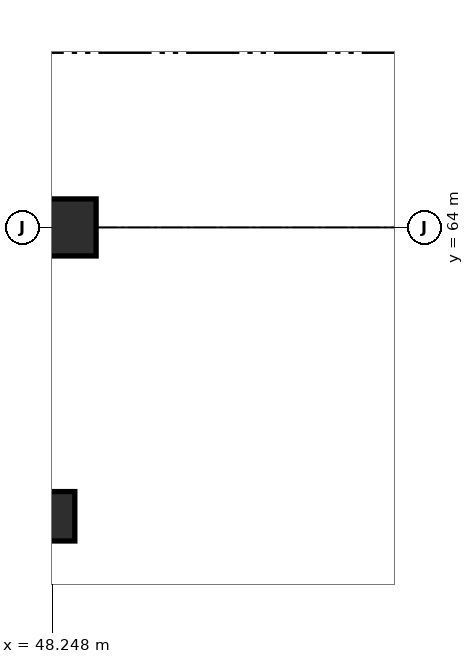
"""IFC4 building model, lengths in metres.
Left out: names, types, materials, properties, quantities, classifications, styles, units other than length and angle.
Written with IfcOpenShell. Run it as: python <this file> out.ifc"""

import sys

from ifc_helpers import new_model, si_unit, direction, frame, origin, origin_2d, place, context, subcontext, project, spatial, rectangle, extrude, element, save


model = new_model("IFC4")
c1 = context("Model", 3, precision=1e-05, world=origin(), true_north=direction((0.0, 1.0)))
c2 = subcontext(c1, "Body", "Model", "MODEL_VIEW")
j1 = project(units=[si_unit("LENGTHUNIT", "METRE"), si_unit("PLANEANGLEUNIT", "RADIAN")], contexts=[c1])
p1 = place(None, origin())
s1 = spatial("IfcSite", under=j1, at=p1, CompositionType="ELEMENT")
p2 = place(p1, origin())
s2 = spatial("IfcBuilding", under=s1, at=p2, CompositionType="ELEMENT")
p3 = place(p2, frame((0.0, 0.0, -3.84)))
s3 = spatial("IfcBuildingStorey", under=s2, at=p3, CompositionType="ELEMENT", Elevation=-3.84)
p4 = place(p3, frame((48.22, 60.2, 0.0), z_axis=(0.0, 0.0, 1.0), x_axis=(1.0, 0.0, 0.0)))
e1 = element("IfcColumn", 1, at=p4, inside=s3, PredefinedType="COLUMN", context=c2, shape_type="SweptSolid", body=[
    extrude(rectangle(XDim=0.65, YDim=0.65, at=origin_2d()), origin(), (0.0, 0.0, 1.0), 3.84),
])
p5 = place(p3, frame((48.45, 64.0, 0.0), z_axis=(0.0, 0.0, 1.0), x_axis=(1.0, 0.0, 0.0)))
e2 = element("IfcColumn", 2, at=p5, inside=s3, PredefinedType="COLUMN", context=c2, shape_type="SweptSolid", body=[
    extrude(rectangle(XDim=0.75, YDim=0.75, at=origin_2d()), origin(), (0.0, 0.0, 1.0), 3.84),
])
save(model, sys.argv[1])
